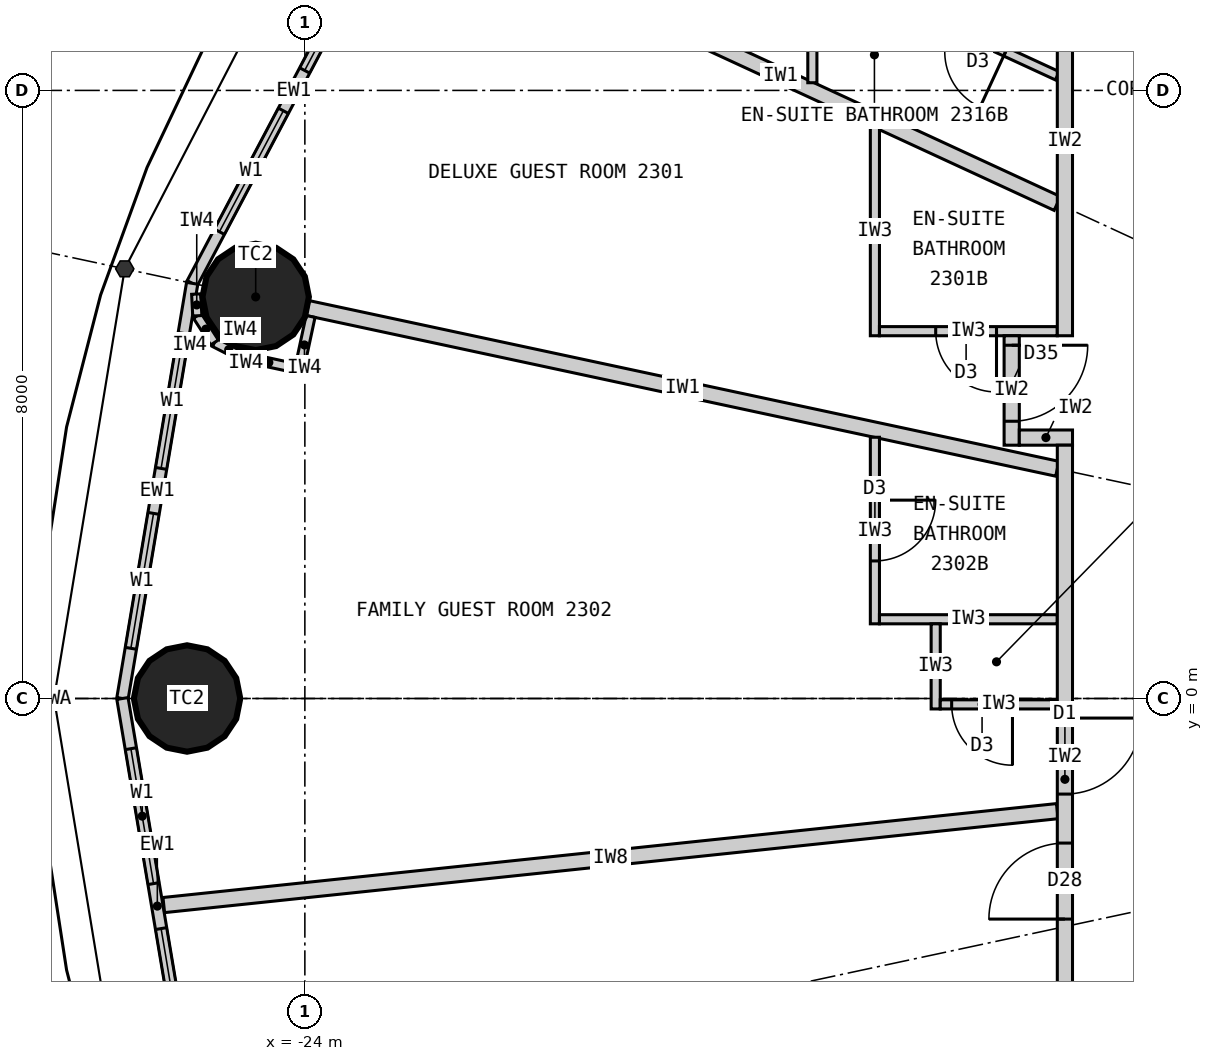
"""IFC4 building model, lengths in metres.
Left out: names, types, materials, properties, quantities, classifications, styles, units other than length and angle.
Written with IfcOpenShell. Run it as: python <this file> out.ifc"""

import sys

from ifc_helpers import new_model, si_unit, direction, frame, frame_2d, origin, origin_2d, place, context, subcontext, project, spatial, rectangle, circle, extrude, clip, halfspace, element, fill, save


model = new_model("IFC4")
c1 = context("Model", 3, precision=1e-05, world=origin(), true_north=direction((0.0, 1.0)))
c2 = subcontext(c1, "Body", "Model", "MODEL_VIEW")
j1 = project(units=[si_unit("LENGTHUNIT", "METRE"), si_unit("PLANEANGLEUNIT", "RADIAN")], contexts=[c1])
p1 = place(None, origin())
s1 = spatial("IfcSite", under=j1, at=p1, CompositionType="ELEMENT")
p2 = place(p1, origin())
s2 = spatial("IfcBuilding", under=s1, at=p2, CompositionType="ELEMENT")
p3 = place(p2, frame((0.0, 0.0, 90.3)))
s3 = spatial("IfcBuildingStorey", under=s2, at=p3, CompositionType="ELEMENT", Elevation=90.3)
for number, where, z_axis, x_axis in (
    (1, (-24.647, 5.283, 0.0), (0.0, 0.0, 1.0), (1.0, 0.0, 0.0)),
    (2, (-25.55, 0.0, 0.0), (0.0, 0.0, 1.0), (1.0, 0.0, 0.0)),
):
    element("IfcColumn", number, at=place(p3, frame(where, z_axis=z_axis, x_axis=x_axis)), inside=s3, PredefinedType="COLUMN", context=c2, shape_type="Clipping", body=[
        clip(extrude(circle(Radius=0.7, at=origin_2d()), origin(), (0.0, 0.0, 1.0), 3.3), halfspace(frame((0.0, 0.0, 2.25), z_axis=(0.0, 0.0, 1.0), x_axis=(1.0, 0.0, 0.0)), False)),
    ])
p4 = place(p3, frame((-22.803, 10.532, 0.0), z_axis=(0.0, 0.0, 1.0), x_axis=(-0.467296867008, -0.884100468321, 0.0)))
e3 = element("IfcWall", 3, at=p4, inside=s3, PredefinedType="ELEMENTEDWALL", context=c2, shape_type="SweptSolid", body=[
    extrude(rectangle(XDim=5.734, YDim=0.15, at=frame_2d((2.867, 0.0))), origin(), (0.0, 0.0, 1.0), 3.05),
])
p5 = place(p4, frame((0.767, 0.0, 0.9)))
e4 = element("IfcOpeningElement", 4, at=p5, cuts=e3, PredefinedType="OPENING", context=c2, shape_type="SweptSolid", body=[
    extrude(rectangle(XDim=1.8, YDim=1.9, at=frame_2d((0.9, 0.95))), frame((0.0, 0.085, 0.0), z_axis=(0.0, -1.0, 0.0), x_axis=(1.0, 0.0, 0.0)), (0.0, 0.0, 1.0), 0.17),
])
p6 = place(p4, frame((3.167, 0.0, 0.9)))
e5 = element("IfcOpeningElement", 5, at=p6, cuts=e3, PredefinedType="OPENING", context=c2, shape_type="SweptSolid", body=[
    extrude(rectangle(XDim=1.8, YDim=1.9, at=frame_2d((0.9, 0.95))), frame((0.0, 0.085, 0.0), z_axis=(0.0, -1.0, 0.0), x_axis=(1.0, 0.0, 0.0)), (0.0, 0.0, 1.0), 0.17),
])
p7 = place(p3, frame((-25.482, 5.462, 0.0), z_axis=(0.0, 0.0, 1.0), x_axis=(-0.165642551694, -0.986185857264, 0.0)))
e6 = element("IfcWall", 6, at=p7, inside=s3, PredefinedType="ELEMENTEDWALL", context=c2, shape_type="SweptSolid", body=[
    extrude(rectangle(XDim=5.539, YDim=0.15, at=frame_2d((2.77, 0.0))), origin(), (0.0, 0.0, 1.0), 3.05),
])
p8 = place(p7, frame((0.669, 0.0, 0.9)))
e7 = element("IfcOpeningElement", 7, at=p8, cuts=e6, PredefinedType="OPENING", context=c2, shape_type="SweptSolid", body=[
    extrude(rectangle(XDim=1.8, YDim=1.9, at=frame_2d((0.9, 0.95))), frame((0.0, 0.085, 0.0), z_axis=(0.0, -1.0, 0.0), x_axis=(1.0, 0.0, 0.0)), (0.0, 0.0, 1.0), 0.17),
])
p9 = place(p7, frame((3.07, 0.0, 0.9)))
e8 = element("IfcOpeningElement", 8, at=p9, cuts=e6, PredefinedType="OPENING", context=c2, shape_type="SweptSolid", body=[
    extrude(rectangle(XDim=1.8, YDim=1.9, at=frame_2d((0.9, 0.95))), frame((0.0, 0.085, 0.0), z_axis=(0.0, -1.0, 0.0), x_axis=(1.0, 0.0, 0.0)), (0.0, 0.0, 1.0), 0.17),
])
p10 = place(p3, frame((-26.4, 0.0, 0.0), z_axis=(0.0, 0.0, 1.0), x_axis=(0.165642551694, -0.986185857264, 0.0)))
e9 = element("IfcWall", 9, at=p10, inside=s3, PredefinedType="ELEMENTEDWALL", context=c2, shape_type="SweptSolid", body=[
    extrude(rectangle(XDim=5.539, YDim=0.15, at=frame_2d((2.77, 0.0))), origin(), (0.0, 0.0, 1.0), 3.05),
])
p11 = place(p10, frame((0.669, 0.0, 0.9)))
e10 = element("IfcOpeningElement", 10, at=p11, cuts=e9, PredefinedType="OPENING", context=c2, shape_type="SweptSolid", body=[
    extrude(rectangle(XDim=1.8, YDim=1.9, at=frame_2d((0.9, 0.95))), frame((0.0, 0.085, 0.0), z_axis=(0.0, -1.0, 0.0), x_axis=(1.0, 0.0, 0.0)), (0.0, 0.0, 1.0), 0.17),
])
p12 = place(p10, frame((3.07, 0.0, 0.9)))
e11 = element("IfcOpeningElement", 11, at=p12, cuts=e9, PredefinedType="OPENING", context=c2, shape_type="SweptSolid", body=[
    extrude(rectangle(XDim=1.8, YDim=1.9, at=frame_2d((0.9, 0.95))), frame((0.0, 0.085, 0.0), z_axis=(0.0, -1.0, 0.0), x_axis=(1.0, 0.0, 0.0)), (0.0, 0.0, 1.0), 0.17),
])
p13 = place(p3, frame((-14.1, 6.512, 0.0), z_axis=(0.0, 0.0, 1.0), x_axis=(-0.907832871056, 0.419332181247, 0.0)))
e12 = element("IfcWall", 12, at=p13, inside=s3, PredefinedType="PARTITIONING", context=c2, shape_type="SweptSolid", body=[
    extrude(rectangle(XDim=8.023, YDim=0.2, at=frame_2d((4.011, 0.0))), origin(), (0.0, 0.0, 1.0), 2.15),
])
p14 = place(p3, frame((-14.1, 3.022, 0.0), z_axis=(0.0, 0.0, 1.0), x_axis=(-0.977790014929, 0.209586943072, 0.0)))
e13 = element("IfcWall", 13, at=p14, inside=s3, PredefinedType="PARTITIONING", context=c2, shape_type="SweptSolid", body=[
    extrude(rectangle(XDim=10.087, YDim=0.2, at=frame_2d((5.043, 0.0))), origin(), (0.0, 0.0, 1.0), 2.05),
])
p15 = place(p3, frame((-14.1, -1.482, 0.0), z_axis=(0.0, 0.0, 1.0), x_axis=(-0.994522076235, -0.104526742422, 0.0)))
e14 = element("IfcWall", 14, at=p15, inside=s3, PredefinedType="PARTITIONING", context=c2, shape_type="SweptSolid", body=[
    extrude(rectangle(XDim=11.821, YDim=0.2, at=frame_2d((5.91, 0.0))), origin(), (0.0, 0.0, 1.0), 2.2),
])
p16 = place(p3, frame((-16.5, 7.521, 0.0), z_axis=(0.0, 0.0, 1.0), x_axis=(0.0, -1.0, 0.0)))
e15 = element("IfcWall", 15, at=p16, inside=s3, PredefinedType="PARTITIONING", context=c2, shape_type="SweptSolid", body=[
    extrude(rectangle(XDim=2.749, YDim=0.12, at=frame_2d((1.374, 0.0))), origin(), (0.0, 0.0, 1.0), 3.05),
])
p17 = place(p3, frame((-14.1, 4.833, 0.0), z_axis=(0.0, 0.0, 1.0), x_axis=(-1.0, 0.0, 0.0)))
e16 = element("IfcWall", 16, at=p17, inside=s3, PredefinedType="PARTITIONING", context=c2, shape_type="SweptSolid", body=[
    extrude(rectangle(XDim=2.34, YDim=0.12, at=frame_2d((1.17, 0.0))), origin(), (0.0, 0.0, 1.0), 3.05),
])
p18 = place(p17, frame((0.8, 0.0, 0.0)))
e17 = element("IfcOpeningElement", 17, at=p18, cuts=e16, PredefinedType="OPENING", context=c2, shape_type="SweptSolid", body=[
    extrude(rectangle(XDim=0.8, YDim=2.1, at=frame_2d((0.4, 1.05))), frame((0.0, 0.07, 0.0), z_axis=(0.0, -1.0, 0.0), x_axis=(1.0, 0.0, 0.0)), (0.0, 0.0, 1.0), 0.14),
])
p19 = place(p3, frame((-16.5, 3.437, 0.0), z_axis=(0.0, 0.0, 1.0), x_axis=(0.0, -1.0, 0.0)))
e18 = element("IfcWall", 18, at=p19, inside=s3, PredefinedType="PARTITIONING", context=c2, shape_type="SweptSolid", body=[
    extrude(rectangle(XDim=2.455, YDim=0.12, at=frame_2d((1.227, 0.0))), origin(), (0.0, 0.0, 1.0), 3.05),
])
p20 = place(p19, frame((0.827, 0.0, 0.0)))
e19 = element("IfcOpeningElement", 19, at=p20, cuts=e18, PredefinedType="OPENING", context=c2, shape_type="SweptSolid", body=[
    extrude(rectangle(XDim=0.8, YDim=2.1, at=frame_2d((0.4, 1.05))), frame((0.0, 0.07, 0.0), z_axis=(0.0, -1.0, 0.0), x_axis=(1.0, 0.0, 0.0)), (0.0, 0.0, 1.0), 0.14),
])
p21 = place(p3, frame((-14.1, 1.042, 0.0), z_axis=(0.0, 0.0, 1.0), x_axis=(-1.0, 0.0, 0.0)))
e20 = element("IfcWall", 20, at=p21, inside=s3, PredefinedType="PARTITIONING", context=c2, shape_type="SweptSolid", body=[
    extrude(rectangle(XDim=2.34, YDim=0.12, at=frame_2d((1.17, 0.0))), origin(), (0.0, 0.0, 1.0), 3.05),
])
p22 = place(p3, frame((-15.7, 0.982, 0.0), z_axis=(0.0, 0.0, 1.0), x_axis=(0.0, -1.0, 0.0)))
e21 = element("IfcWall", 21, at=p22, inside=s3, PredefinedType="PARTITIONING", context=c2, shape_type="SweptSolid", body=[
    extrude(rectangle(XDim=1.12, YDim=0.12, at=frame_2d((0.56, 0.0))), origin(), (0.0, 0.0, 1.0), 3.05),
])
p23 = place(p3, frame((-14.1, -0.078, 0.0), z_axis=(0.0, 0.0, 1.0), x_axis=(-1.0, 0.0, 0.0)))
e22 = element("IfcWall", 22, at=p23, inside=s3, PredefinedType="PARTITIONING", context=c2, shape_type="SweptSolid", body=[
    extrude(rectangle(XDim=1.54, YDim=0.12, at=frame_2d((0.77, 0.0))), origin(), (0.0, 0.0, 1.0), 2.25),
])
p24 = place(p23, frame((0.59, 0.0, 0.0)))
e23 = element("IfcOpeningElement", 23, at=p24, cuts=e22, PredefinedType="OPENING", context=c2, shape_type="SweptSolid", body=[
    extrude(rectangle(XDim=0.8, YDim=2.1, at=frame_2d((0.4, 1.05))), frame((0.0, 0.07, 0.0), z_axis=(0.0, -1.0, 0.0), x_axis=(1.0, 0.0, 0.0)), (0.0, 0.0, 1.0), 0.14),
])
p25 = place(p3, frame((-17.323, 8.101, 0.0), z_axis=(0.0, 0.0, 1.0), x_axis=(0.0, 1.0, 0.0)))
e24 = element("IfcWall", 24, at=p25, inside=s3, PredefinedType="PARTITIONING", context=c2, shape_type="SweptSolid", body=[
    extrude(rectangle(XDim=1.64, YDim=0.12, at=frame_2d((0.82, 0.0))), origin(), (0.0, 0.0, 1.0), 3.05),
])
p26 = place(p3, frame((-14.1, 8.193, 0.0), z_axis=(0.0, 0.0, 1.0), x_axis=(-0.907836493557, 0.419324338628, 0.0)))
e25 = element("IfcWall", 25, at=p26, inside=s3, PredefinedType="PARTITIONING", context=c2, shape_type="SweptSolid", body=[
    extrude(rectangle(XDim=3.49, YDim=0.12, at=frame_2d((1.745, 0.0))), origin(), (0.0, 0.0, 1.0), 3.05),
])
p27 = place(p26, frame((0.75, 0.0, 0.0)))
e26 = element("IfcOpeningElement", 26, at=p27, cuts=e25, PredefinedType="OPENING", context=c2, shape_type="SweptSolid", body=[
    extrude(rectangle(XDim=0.8, YDim=2.1, at=frame_2d((0.4, 1.05))), frame((0.0, 0.07, 0.0), z_axis=(0.0, -1.0, 0.0), x_axis=(1.0, 0.0, 0.0)), (0.0, 0.0, 1.0), 0.14),
])
p28 = place(p3, frame((-14.7, 4.772, 0.0), z_axis=(0.0, 0.0, 1.0), x_axis=(0.0, -1.0, 0.0)))
e27 = element("IfcWall", 27, at=p28, inside=s3, PredefinedType="PARTITIONING", context=c2, shape_type="SweptSolid", body=[
    extrude(rectangle(XDim=1.44, YDim=0.2, at=frame_2d((0.72, 0.0))), origin(), (0.0, 0.0, 1.0), 3.05),
])
p29 = place(p28, frame((0.125, 0.0, 0.0)))
e28 = element("IfcOpeningElement", 28, at=p29, cuts=e27, PredefinedType="OPENING", context=c2, shape_type="SweptSolid", body=[
    extrude(rectangle(XDim=1.0, YDim=2.0, at=frame_2d((0.5, 1.0))), frame((0.0, 0.11, 0.0), z_axis=(0.0, -1.0, 0.0), x_axis=(1.0, 0.0, 0.0)), (0.0, 0.0, 1.0), 0.22),
])
p30 = place(p3, frame((-13.9, 3.433, 0.0), z_axis=(0.0, 0.0, 1.0), x_axis=(-1.0, 0.0, 0.0)))
e29 = element("IfcWall", 29, at=p30, inside=s3, PredefinedType="PARTITIONING", context=c2, shape_type="SweptSolid", body=[
    extrude(rectangle(XDim=0.7, YDim=0.2, at=frame_2d((0.35, 0.0))), origin(), (0.0, 0.0, 1.0), 2.05),
])
p31 = place(p3, frame((-14.0, 9.9, 0.0), z_axis=(0.0, 0.0, 1.0), x_axis=(0.0, -1.0, 0.0)))
e30 = element("IfcWall", 30, at=p31, inside=s3, PredefinedType="PARTITIONING", context=c2, shape_type="SweptSolid", body=[
    extrude(rectangle(XDim=5.127, YDim=0.2, at=frame_2d((2.564, 0.0))), origin(), (0.0, 0.0, 1.0), 3.05),
])
p32 = place(p31, frame((0.103, 0.0, 0.0)))
e31 = element("IfcOpeningElement", 31, at=p32, cuts=e30, PredefinedType="OPENING", context=c2, shape_type="SweptSolid", body=[
    extrude(rectangle(XDim=1.0, YDim=2.2, at=frame_2d((0.5, 1.1))), frame((0.0, 0.11, 0.0), z_axis=(0.0, -1.0, 0.0), x_axis=(1.0, 0.0, 0.0)), (0.0, 0.0, 1.0), 0.22),
])
p33 = place(p3, frame((-14.0, 3.333, 0.0), z_axis=(0.0, 0.0, 1.0), x_axis=(0.0, -1.0, 0.0)))
e32 = element("IfcWall", 32, at=p33, inside=s3, PredefinedType="PARTITIONING", context=c2, shape_type="SweptSolid", body=[
    extrude(rectangle(XDim=8.792, YDim=0.2, at=frame_2d((4.396, 0.0))), origin(), (0.0, 0.0, 1.0), 3.05),
])
p34 = place(p33, frame((3.59, 0.0, 0.0)))
e33 = element("IfcOpeningElement", 33, at=p34, cuts=e32, PredefinedType="OPENING", context=c2, shape_type="SweptSolid", body=[
    extrude(rectangle(XDim=1.0, YDim=2.2, at=frame_2d((0.5, 1.1))), frame((0.0, 0.11, 0.0), z_axis=(0.0, -1.0, 0.0), x_axis=(1.0, 0.0, 0.0)), (0.0, 0.0, 1.0), 0.22),
])
p35 = place(p33, frame((5.234, 0.0, 0.0)))
e34 = element("IfcOpeningElement", 34, at=p35, cuts=e32, PredefinedType="OPENING", context=c2, shape_type="SweptSolid", body=[
    extrude(rectangle(XDim=1.0, YDim=2.2, at=frame_2d((0.5, 1.1))), frame((0.0, 0.11, 0.0), z_axis=(0.0, -1.0, 0.0), x_axis=(1.0, 0.0, 0.0)), (0.0, 0.0, 1.0), 0.22),
])
p36 = place(p3, frame((-23.925, 5.026, 0.0), z_axis=(0.0, 0.0, 1.0), x_axis=(-0.209681192172, -0.977769808109, 0.0)))
e35 = element("IfcWall", 35, at=p36, inside=s3, PredefinedType="PARTITIONING", context=c2, shape_type="SweptSolid", body=[
    extrude(rectangle(XDim=0.767, YDim=0.12, at=frame_2d((0.384, 0.0))), origin(), (0.0, 0.0, 1.0), 3.05),
])
p37 = place(p3, frame((-24.132, 4.347, 0.0), z_axis=(0.0, 0.0, 1.0), x_axis=(-0.977776882509, 0.209648200638, 0.0)))
e36 = element("IfcWall", 36, at=p37, inside=s3, PredefinedType="PARTITIONING", context=c2, shape_type="SweptSolid", body=[
    extrude(rectangle(XDim=0.7, YDim=0.12, at=frame_2d((0.35, 0.0))), origin(), (0.0, 0.0, 1.0), 3.05),
])
for number, where, z_axis, x_axis in (
    (37, (-24.816, 4.494, 0.0), (0.0, 0.0, 1.0), (-0.89, 0.455, 0.0)),
    (38, (-25.188, 4.684, 0.0), (0.0, 0.0, 1.0), (-0.543, 0.84, 0.0)),
):
    element("IfcWall", number, at=place(p3, frame(where, z_axis=z_axis, x_axis=x_axis)), inside=s3, PredefinedType="PARTITIONING", context=c2, shape_type="SweptSolid", body=[
        extrude(rectangle(XDim=0.418, YDim=0.12, at=frame_2d((0.209, 0.0))), origin(), (0.0, 0.0, 1.0), 3.05),
    ])
p38 = place(p3, frame((-25.416, 5.035, 0.0), z_axis=(0.0, 0.0, 1.0), x_axis=(-0.050406329159, 0.998728793007, 0.0)))
e39 = element("IfcWall", 39, at=p38, inside=s3, PredefinedType="PARTITIONING", context=c2, shape_type="SweptSolid", body=[
    extrude(rectangle(XDim=0.286, YDim=0.12, at=frame_2d((0.143, 0.0))), origin(), (0.0, 0.0, 1.0), 3.05),
])
p39 = place(p5, origin())
e40 = element("IfcWindow", 40, at=p39, inside=s3, PartitioningType="SINGLE_PANEL", PredefinedType="WINDOW", context=c2, shape_type="SweptSolid", body=[
    extrude(rectangle(XDim=1.8, YDim=1.9, at=frame_2d((0.9, 0.95))), frame((0.0, 0.03, 0.0), z_axis=(0.0, -1.0, 0.0), x_axis=(1.0, 0.0, 0.0)), (0.0, 0.0, 1.0), 0.06),
])
fill(e4, e40)
p40 = place(p6, origin())
e41 = element("IfcWindow", 41, at=p40, inside=s3, PartitioningType="SINGLE_PANEL", PredefinedType="WINDOW", context=c2, shape_type="SweptSolid", body=[
    extrude(rectangle(XDim=1.8, YDim=1.9, at=frame_2d((0.9, 0.95))), frame((0.0, 0.03, 0.0), z_axis=(0.0, -1.0, 0.0), x_axis=(1.0, 0.0, 0.0)), (0.0, 0.0, 1.0), 0.06),
])
fill(e5, e41)
p41 = place(p8, origin())
e42 = element("IfcWindow", 42, at=p41, inside=s3, PartitioningType="SINGLE_PANEL", PredefinedType="WINDOW", context=c2, shape_type="SweptSolid", body=[
    extrude(rectangle(XDim=1.8, YDim=1.9, at=frame_2d((0.9, 0.95))), frame((0.0, 0.03, 0.0), z_axis=(0.0, -1.0, 0.0), x_axis=(1.0, 0.0, 0.0)), (0.0, 0.0, 1.0), 0.06),
])
fill(e7, e42)
p42 = place(p9, origin())
e43 = element("IfcWindow", 43, at=p42, inside=s3, PartitioningType="SINGLE_PANEL", PredefinedType="WINDOW", context=c2, shape_type="SweptSolid", body=[
    extrude(rectangle(XDim=1.8, YDim=1.9, at=frame_2d((0.9, 0.95))), frame((0.0, 0.03, 0.0), z_axis=(0.0, -1.0, 0.0), x_axis=(1.0, 0.0, 0.0)), (0.0, 0.0, 1.0), 0.06),
])
fill(e8, e43)
p43 = place(p11, origin())
e44 = element("IfcWindow", 44, at=p43, inside=s3, PartitioningType="SINGLE_PANEL", PredefinedType="WINDOW", context=c2, shape_type="SweptSolid", body=[
    extrude(rectangle(XDim=1.8, YDim=1.9, at=frame_2d((0.9, 0.95))), frame((0.0, 0.03, 0.0), z_axis=(0.0, -1.0, 0.0), x_axis=(1.0, 0.0, 0.0)), (0.0, 0.0, 1.0), 0.06),
])
fill(e10, e44)
p44 = place(p12, origin())
e45 = element("IfcWindow", 45, at=p44, inside=s3, PartitioningType="SINGLE_PANEL", PredefinedType="WINDOW", context=c2, shape_type="SweptSolid", body=[
    extrude(rectangle(XDim=1.8, YDim=1.9, at=frame_2d((0.9, 0.95))), frame((0.0, 0.03, 0.0), z_axis=(0.0, -1.0, 0.0), x_axis=(1.0, 0.0, 0.0)), (0.0, 0.0, 1.0), 0.06),
])
fill(e11, e45)
p45 = place(p18, origin())
e46 = element("IfcDoor", 46, at=p45, inside=s3, OperationType="SINGLE_SWING_LEFT", PredefinedType="DOOR", context=c2, shape_type="SweptSolid", body=[
    extrude(rectangle(XDim=0.8, YDim=2.1, at=frame_2d((0.4, 1.05))), frame((0.0, 0.025, 0.0), z_axis=(0.0, -1.0, 0.0), x_axis=(1.0, 0.0, 0.0)), (0.0, 0.0, 1.0), 0.05),
])
fill(e17, e46)
p46 = place(p29, origin())
e47 = element("IfcDoor", 47, at=p46, inside=s3, OperationType="SINGLE_SWING_LEFT", PredefinedType="DOOR", context=c2, shape_type="SweptSolid", body=[
    extrude(rectangle(XDim=1.0, YDim=2.0, at=frame_2d((0.5, 1.0))), frame((0.0, 0.025, 0.0), z_axis=(0.0, -1.0, 0.0), x_axis=(1.0, 0.0, 0.0)), (0.0, 0.0, 1.0), 0.05),
])
fill(e28, e47)
p47 = place(p20, origin())
e48 = element("IfcDoor", 48, at=p47, inside=s3, OperationType="SINGLE_SWING_LEFT", PredefinedType="DOOR", context=c2, shape_type="SweptSolid", body=[
    extrude(rectangle(XDim=0.8, YDim=2.1, at=frame_2d((0.4, 1.05))), frame((0.0, 0.025, 0.0), z_axis=(0.0, -1.0, 0.0), x_axis=(1.0, 0.0, 0.0)), (0.0, 0.0, 1.0), 0.05),
])
fill(e19, e48)
p48 = place(p24, origin())
e49 = element("IfcDoor", 49, at=p48, inside=s3, OperationType="SINGLE_SWING_LEFT", PredefinedType="DOOR", context=c2, shape_type="SweptSolid", body=[
    extrude(rectangle(XDim=0.8, YDim=2.1, at=frame_2d((0.4, 1.05))), frame((0.0, 0.025, 0.0), z_axis=(0.0, -1.0, 0.0), x_axis=(1.0, 0.0, 0.0)), (0.0, 0.0, 1.0), 0.05),
])
fill(e23, e49)
p49 = place(p34, origin())
e50 = element("IfcDoor", 50, at=p49, inside=s3, OperationType="SINGLE_SWING_LEFT", PredefinedType="DOOR", context=c2, shape_type="SweptSolid", body=[
    extrude(rectangle(XDim=1.0, YDim=2.2, at=frame_2d((0.5, 1.1))), frame((0.0, 0.025, 0.0), z_axis=(0.0, -1.0, 0.0), x_axis=(1.0, 0.0, 0.0)), (0.0, 0.0, 1.0), 0.05),
])
fill(e33, e50)
p50 = place(p35, origin())
e51 = element("IfcDoor", 51, at=p50, inside=s3, OperationType="SINGLE_SWING_RIGHT", PredefinedType="DOOR", context=c2, shape_type="SweptSolid", body=[
    extrude(rectangle(XDim=1.0, YDim=2.2, at=frame_2d((0.5, 1.1))), frame((0.0, 0.025, 0.0), z_axis=(0.0, -1.0, 0.0), x_axis=(1.0, 0.0, 0.0)), (0.0, 0.0, 1.0), 0.05),
])
fill(e34, e51)
p51 = place(p27, origin())
e52 = element("IfcDoor", 52, at=p51, inside=s3, OperationType="SINGLE_SWING_LEFT", PredefinedType="DOOR", context=c2, shape_type="SweptSolid", body=[
    extrude(rectangle(XDim=0.8, YDim=2.1, at=frame_2d((0.4, 1.05))), frame((0.0, 0.025, 0.0), z_axis=(0.0, -1.0, 0.0), x_axis=(1.0, 0.0, 0.0)), (0.0, 0.0, 1.0), 0.05),
])
fill(e26, e52)
save(model, sys.argv[1])
